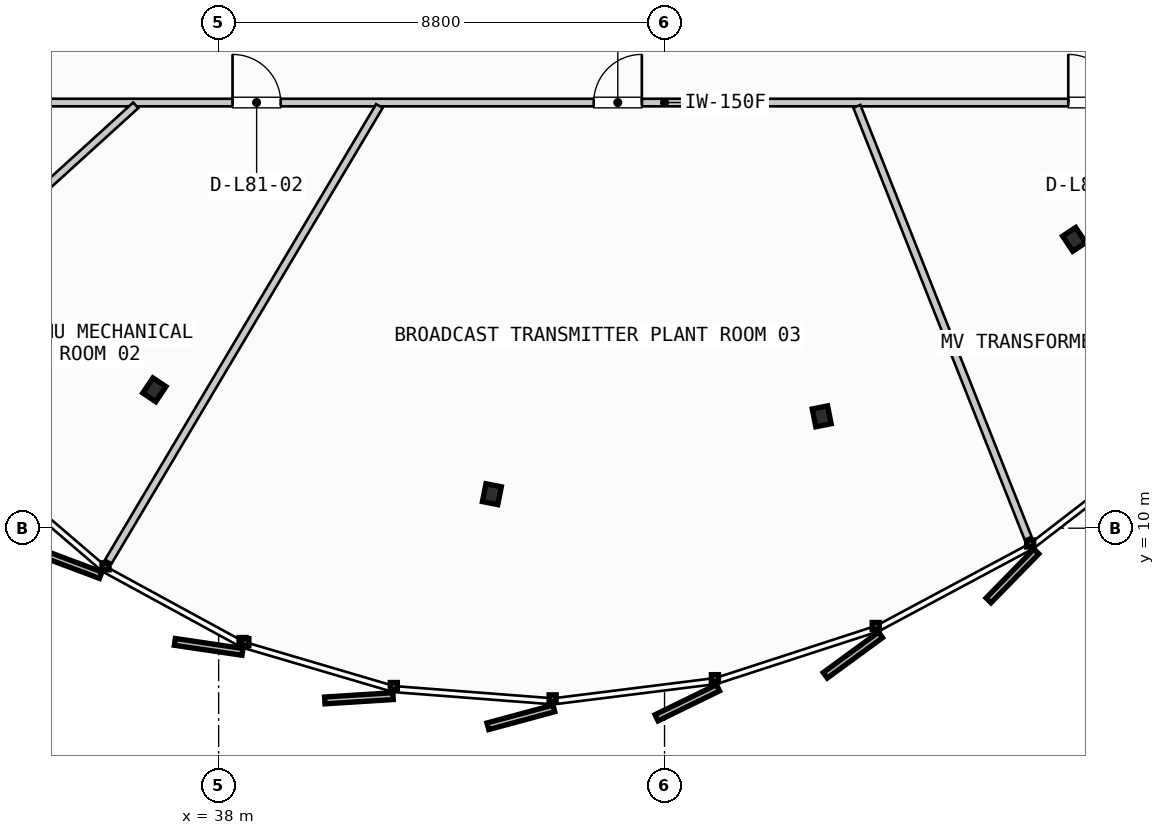
"""IFC4 building model, lengths in metres.
Left out: names, types, materials, properties, quantities, classifications, styles, units other than length and angle.
Written with IfcOpenShell. Run it as: python <this file> out.ifc"""

import sys

from ifc_helpers import new_model, si_unit, direction, frame, frame_2d, origin, origin_2d, place, context, subcontext, project, spatial, rectangle, i_section, extrude, source, transform, mapped, element, fill, save


model = new_model("IFC4")
c1 = context("Model", 3, precision=1e-05, world=origin(), true_north=direction((0.0, 1.0)))
c2 = subcontext(c1, "Body", "Model", "MODEL_VIEW")
j1 = project(units=[si_unit("LENGTHUNIT", "METRE"), si_unit("PLANEANGLEUNIT", "RADIAN")], contexts=[c1])
p1 = place(None, origin())
s1 = spatial("IfcSite", under=j1, at=p1, CompositionType="ELEMENT")
p2 = place(p1, origin())
s2 = spatial("IfcBuilding", under=s1, at=p2, CompositionType="ELEMENT")
p3 = place(p2, frame((0.0, 0.0, 304.3)))
s3 = spatial("IfcBuildingStorey", under=s2, at=p3, CompositionType="ELEMENT", Elevation=304.3)
m1 = source(origin(), c2, "Body", "SweptSolid", [
    extrude(i_section(OverallWidth=0.309, OverallDepth=0.359, WebThickness=0.016, FlangeThickness=0.026, FilletRadius=0.027, at=origin_2d()), origin(), (0.0, 0.0, 1.0), 3.735),
])
for number, where, z_axis, x_axis in (
    (1, (36.731, 12.731, 0.0), (0.0, 0.0, 1.0), (-0.556, -0.831, 0.0)),
    (2, (43.393, 10.671, 0.0), (0.0, 0.0, 1.0), (-0.195, -0.981, 0.0)),
    (3, (49.902, 12.207, 0.0), (0.0, 0.0, 1.0), (0.195, -0.981, 0.0)),
    (4, (54.885, 15.7, 0.0), (0.0, 0.0, 1.0), (0.556, -0.831, 0.0)),
):
    element("IfcColumn", number, at=place(p3, frame(where, z_axis=z_axis, x_axis=x_axis)), inside=s3, PredefinedType="COLUMN", context=c2, shape_type="MappedRepresentation", body=[
        mapped(m1, transform((0.0, 0.0, 0.0), scale=1.0)),
    ])
p4 = place(p3, frame((33.1, 18.4, 0.0), z_axis=(0.0, 0.0, 1.0), x_axis=(1.0, 0.0, 0.0)))
e5 = element("IfcWall", 5, at=p4, inside=s3, PredefinedType="PARTITIONING", context=c2, shape_type="SweptSolid", body=[
    extrude(rectangle(XDim=27.4, YDim=0.15, at=frame_2d((13.7, 0.0))), origin(), (0.0, 0.0, 1.0), 3.26),
])
p5 = place(p4, frame((5.174, 0.0, 0.0)))
e6 = element("IfcOpeningElement", 6, at=p5, cuts=e5, PredefinedType="OPENING", context=c2, shape_type="SweptSolid", body=[
    extrude(rectangle(XDim=0.95, YDim=2.15, at=frame_2d((0.475, 1.075))), frame((0.0, 0.085, 0.0), z_axis=(0.0, -1.0, 0.0), x_axis=(1.0, 0.0, 0.0)), (0.0, 0.0, 1.0), 0.17),
])
p6 = place(p4, frame((12.302, 0.0, 0.0)))
e7 = element("IfcOpeningElement", 7, at=p6, cuts=e5, PredefinedType="OPENING", context=c2, shape_type="SweptSolid", body=[
    extrude(rectangle(XDim=0.95, YDim=2.15, at=frame_2d((0.475, 1.075))), frame((0.0, 0.085, 0.0), z_axis=(0.0, -1.0, 0.0), x_axis=(1.0, 0.0, 0.0)), (0.0, 0.0, 1.0), 0.17),
])
p7 = place(p4, frame((21.668, 0.0, 0.0)))
e8 = element("IfcOpeningElement", 8, at=p7, cuts=e5, PredefinedType="OPENING", context=c2, shape_type="SweptSolid", body=[
    extrude(rectangle(XDim=0.95, YDim=2.15, at=frame_2d((0.475, 1.075))), frame((0.0, 0.085, 0.0), z_axis=(0.0, -1.0, 0.0), x_axis=(1.0, 0.0, 0.0)), (0.0, 0.0, 1.0), 0.17),
])
p8 = place(p3, frame((36.364, 18.346, 0.0), z_axis=(0.0, 0.0, 1.0), x_axis=(-0.74023680204, -0.672346247781, 0.0)))
e9 = element("IfcWall", 9, at=p8, inside=s3, PredefinedType="PARTITIONING", context=c2, shape_type="SweptSolid", body=[
    extrude(rectangle(XDim=6.588, YDim=0.15, at=frame_2d((3.294, 0.0))), origin(), (0.0, 0.0, 1.0), 3.26),
])
p9 = place(p3, frame((41.172, 18.331, 0.0), z_axis=(0.0, 0.0, 1.0), x_axis=(-0.511265536161, -0.859422801381, 0.0)))
e10 = element("IfcWall", 10, at=p9, inside=s3, PredefinedType="PARTITIONING", context=c2, shape_type="SweptSolid", body=[
    extrude(rectangle(XDim=10.46, YDim=0.15, at=frame_2d((5.23, 0.0))), origin(), (0.0, 0.0, 1.0), 3.26),
])
p10 = place(p3, frame((50.595, 18.326, 0.0), z_axis=(0.0, 0.0, 1.0), x_axis=(0.368634843387, -0.929574285488, 0.0)))
e11 = element("IfcWall", 11, at=p10, inside=s3, PredefinedType="PARTITIONING", context=c2, shape_type="SweptSolid", body=[
    extrude(rectangle(XDim=9.17, YDim=0.15, at=frame_2d((4.585, 0.0))), origin(), (0.0, 0.0, 1.0), 3.26),
])
m2 = source(origin(), c2, "Body", "SweptSolid", [
    extrude(rectangle(XDim=0.95, YDim=2.15, at=frame_2d((0.475, 1.075))), frame((0.0, 0.025, 0.0), z_axis=(0.0, -1.0, 0.0), x_axis=(1.0, 0.0, 0.0)), (0.0, 0.0, 1.0), 0.05),
])
p11 = place(p5, origin())
e12 = element("IfcDoor", 12, at=p11, inside=s3, OperationType="SINGLE_SWING_LEFT", PredefinedType="DOOR", context=c2, shape_type="MappedRepresentation", body=[
    mapped(m2, transform((0.0, 0.0, 0.0), scale=1.0)),
])
fill(e6, e12)
p12 = place(p6, origin())
e13 = element("IfcDoor", 13, at=p12, inside=s3, OperationType="SINGLE_SWING_RIGHT", PredefinedType="DOOR", context=c2, shape_type="MappedRepresentation", body=[
    mapped(m2, transform((0.0, 0.0, 0.0), scale=1.0)),
])
fill(e7, e13)
p13 = place(p7, origin())
e14 = element("IfcDoor", 14, at=p13, inside=s3, OperationType="SINGLE_SWING_LEFT", PredefinedType="DOOR", context=c2, shape_type="MappedRepresentation", body=[
    mapped(m2, transform((0.0, 0.0, 0.0), scale=1.0)),
])
fill(e8, e14)
save(model, sys.argv[1])
